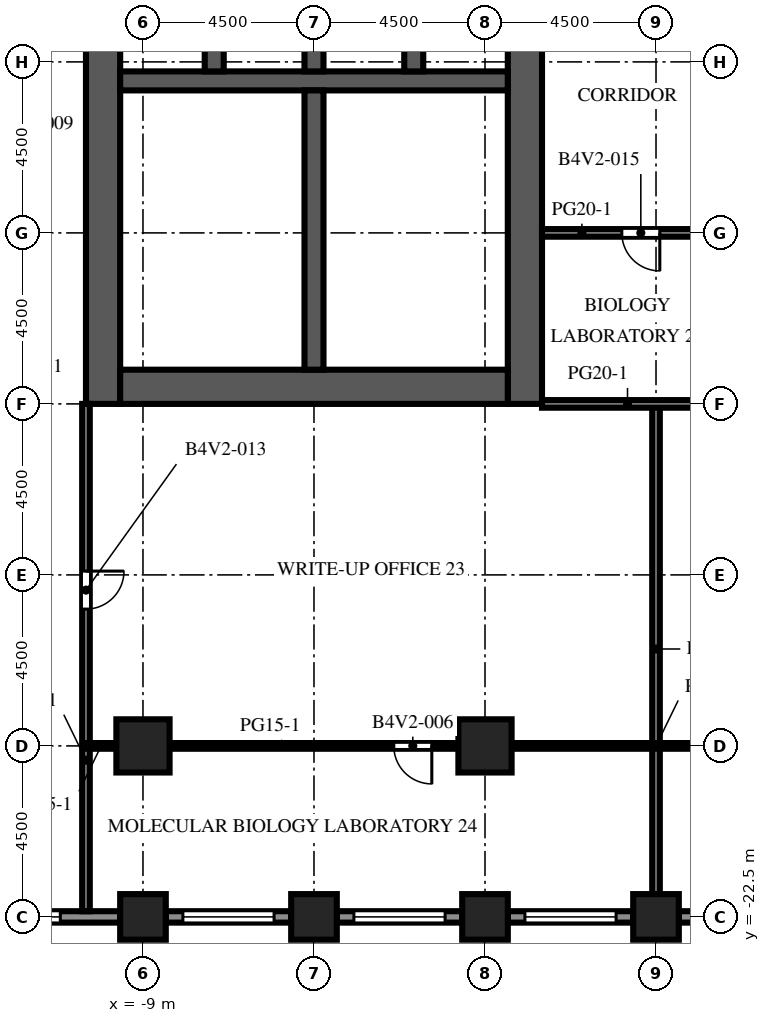
"""IFC4 building model, lengths in metres.
Left out: names, types, materials, properties, quantities, classifications, styles, units other than length and angle.
Written with IfcOpenShell. Run it as: python <this file> out.ifc"""

import sys

from ifc_helpers import new_model, si_unit, direction, frame, frame_2d, origin, origin_2d, place, context, subcontext, project, spatial, rectangle, extrude, element, fill, save


model = new_model("IFC4")
c1 = context("Model", 3, precision=1e-05, world=origin(), true_north=direction((0.0, 1.0)))
c2 = subcontext(c1, "Body", "Model", "MODEL_VIEW")
j1 = project(units=[si_unit("LENGTHUNIT", "METRE"), si_unit("PLANEANGLEUNIT", "RADIAN")], contexts=[c1])
p1 = place(None, origin())
s1 = spatial("IfcSite", under=j1, at=p1, CompositionType="ELEMENT")
p2 = place(p1, origin())
s2 = spatial("IfcBuilding", under=s1, at=p2, CompositionType="ELEMENT")
p3 = place(p2, frame((0.0, 0.0, 137.2)))
s3 = spatial("IfcBuildingStorey", under=s2, at=p3, CompositionType="ELEMENT", Elevation=137.2)
for number, where, z_axis, x_axis in (
    (1, (-9.0, -22.5, 0.0), (0.0, 0.0, 1.0), (1.0, 0.0, 0.0)),
    (2, (-4.5, -22.5, 0.0), (0.0, 0.0, 1.0), (1.0, 0.0, 0.0)),
    (3, (0.0, -22.5, 0.0), (0.0, 0.0, 1.0), (1.0, 0.0, 0.0)),
    (4, (4.5, -22.5, 0.0), (0.0, 0.0, 1.0), (1.0, 0.0, 0.0)),
):
    element("IfcColumn", number, at=place(p3, frame(where, z_axis=z_axis, x_axis=x_axis)), inside=s3, PredefinedType="COLUMN", context=c2, shape_type="SweptSolid", body=[
        extrude(rectangle(XDim=1.2, YDim=1.2, at=origin_2d()), origin(), (0.0, 0.0, 1.0), 4.1),
    ])
for number, where, z_axis, x_axis in (
    (5, (-9.0, -18.0, 0.0), (0.0, 0.0, 1.0), (1.0, 0.0, 0.0)),
    (6, (0.0, -18.0, 0.0), (0.0, 0.0, 1.0), (1.0, 0.0, 0.0)),
):
    element("IfcColumn", number, at=place(p3, frame(where, z_axis=z_axis, x_axis=x_axis)), inside=s3, PredefinedType="COLUMN", context=c2, shape_type="SweptSolid", body=[
        extrude(rectangle(XDim=1.4, YDim=1.4, at=origin_2d()), origin(), (0.0, 0.0, 1.0), 4.1),
    ])
p4 = place(p3, frame((-10.05, -9.0, 0.0), z_axis=(0.0, 0.0, 1.0), x_axis=(0.0, 1.0, 0.0)))
e7 = element("IfcWall", 7, at=p4, inside=s3, PredefinedType="SHEAR", context=c2, shape_type="SweptSolid", body=[
    extrude(rectangle(XDim=27.5, YDim=0.9, at=frame_2d((13.75, 0.0))), origin(), (0.0, 0.0, 1.0), 4.1),
])
p5 = place(p4, frame((12.55, 0.0, 0.0)))
e8 = element("IfcOpeningElement", 8, at=p5, cuts=e7, PredefinedType="OPENING", context=c2, shape_type="SweptSolid", body=[
    extrude(rectangle(XDim=2.4, YDim=2.4, at=frame_2d((1.2, 1.2))), frame((0.0, 0.46, 0.0), z_axis=(0.0, -1.0, 0.0), x_axis=(1.0, 0.0, 0.0)), (0.0, 0.0, 1.0), 0.92),
])
p6 = place(p4, frame((6.825, 0.0, 0.0)))
e9 = element("IfcOpeningElement", 9, at=p6, cuts=e7, PredefinedType="OPENING", context=c2, shape_type="SweptSolid", body=[
    extrude(rectangle(XDim=1.2, YDim=2.1, at=frame_2d((0.6, 1.05))), frame((0.0, 0.46, 0.0), z_axis=(0.0, -1.0, 0.0), x_axis=(1.0, 0.0, 0.0)), (0.0, 0.0, 1.0), 0.92),
])
p7 = place(p4, frame((19.475, 0.0, 0.0)))
e10 = element("IfcOpeningElement", 10, at=p7, cuts=e7, PredefinedType="OPENING", context=c2, shape_type="SweptSolid", body=[
    extrude(rectangle(XDim=1.2, YDim=2.1, at=frame_2d((0.6, 1.05))), frame((0.0, 0.46, 0.0), z_axis=(0.0, -1.0, 0.0), x_axis=(1.0, 0.0, 0.0)), (0.0, 0.0, 1.0), 0.92),
])
p8 = place(p3, frame((1.05, -9.0, 0.0), z_axis=(0.0, 0.0, 1.0), x_axis=(0.0, 1.0, 0.0)))
e11 = element("IfcWall", 11, at=p8, inside=s3, PredefinedType="SHEAR", context=c2, shape_type="SweptSolid", body=[
    extrude(rectangle(XDim=27.5, YDim=0.9, at=frame_2d((13.75, 0.0))), origin(), (0.0, 0.0, 1.0), 4.1),
])
p9 = place(p8, frame((12.55, 0.0, 0.0)))
e12 = element("IfcOpeningElement", 12, at=p9, cuts=e11, PredefinedType="OPENING", context=c2, shape_type="SweptSolid", body=[
    extrude(rectangle(XDim=2.4, YDim=2.4, at=frame_2d((1.2, 1.2))), frame((0.0, 0.46, 0.0), z_axis=(0.0, -1.0, 0.0), x_axis=(1.0, 0.0, 0.0)), (0.0, 0.0, 1.0), 0.92),
])
p10 = place(p8, frame((5.51, 0.0, 0.0)))
e13 = element("IfcOpeningElement", 13, at=p10, cuts=e11, PredefinedType="OPENING", context=c2, shape_type="SweptSolid", body=[
    extrude(rectangle(XDim=0.923, YDim=2.1, at=frame_2d((0.461, 1.05))), frame((0.0, 0.46, 0.0), z_axis=(0.0, -1.0, 0.0), x_axis=(1.0, 0.0, 0.0)), (0.0, 0.0, 1.0), 0.92),
])
p11 = place(p8, frame((23.427, 0.0, 0.0)))
e14 = element("IfcOpeningElement", 14, at=p11, cuts=e11, PredefinedType="OPENING", context=c2, shape_type="SweptSolid", body=[
    extrude(rectangle(XDim=1.2, YDim=2.1, at=frame_2d((0.6, 1.05))), frame((0.0, 0.46, 0.0), z_axis=(0.0, -1.0, 0.0), x_axis=(1.0, 0.0, 0.0)), (0.0, 0.0, 1.0), 0.92),
])
p12 = place(p3, frame((-9.6, -8.55, 0.0), z_axis=(0.0, 0.0, 1.0), x_axis=(1.0, 0.0, 0.0)))
e15 = element("IfcWall", 15, at=p12, inside=s3, PredefinedType="SHEAR", context=c2, shape_type="SweptSolid", body=[
    extrude(rectangle(XDim=10.2, YDim=0.9, at=frame_2d((5.1, 0.0))), origin(), (0.0, 0.0, 1.0), 4.1),
])
p13 = place(p3, frame((-9.6, -0.5, 0.0), z_axis=(0.0, 0.0, 1.0), x_axis=(1.0, 0.0, 0.0)))
e16 = element("IfcWall", 16, at=p13, inside=s3, PredefinedType="SHEAR", context=c2, shape_type="SweptSolid", body=[
    extrude(rectangle(XDim=10.2, YDim=0.5, at=frame_2d((5.1, 0.0))), origin(), (0.0, 0.0, 1.0), 4.1),
])
for number, where, z_axis, x_axis in (
    (17, (-7.125, -0.25, 0.0), (0.0, 0.0, 1.0), (0.0, 1.0, 0.0)),
    (18, (-4.5, -0.25, 0.0), (0.0, 0.0, 1.0), (0.0, 1.0, 0.0)),
    (19, (-1.875, -0.25, 0.0), (0.0, 0.0, 1.0), (0.0, 1.0, 0.0)),
):
    element("IfcWall", number, at=place(p3, frame(where, z_axis=z_axis, x_axis=x_axis)), inside=s3, PredefinedType="SHEAR", context=c2, shape_type="SweptSolid", body=[
        extrude(rectangle(XDim=2.8, YDim=0.5, at=frame_2d((1.4, 0.0))), origin(), (0.0, 0.0, 1.0), 4.1),
    ])
p14 = place(p3, frame((-4.5, -8.1, 0.0), z_axis=(0.0, 0.0, 1.0), x_axis=(0.0, 1.0, 0.0)))
e20 = element("IfcWall", 20, at=p14, inside=s3, PredefinedType="SHEAR", context=c2, shape_type="SweptSolid", body=[
    extrude(rectangle(XDim=7.35, YDim=0.5, at=frame_2d((3.675, 0.0))), origin(), (0.0, 0.0, 1.0), 4.1),
])
p15 = place(p3, frame((-9.6, -22.5, 0.0), z_axis=(0.0, 0.0, 1.0), x_axis=(-1.0, 0.0, 0.0)))
e21 = element("IfcWall", 21, at=p15, inside=s3, PredefinedType="SOLIDWALL", context=c2, shape_type="SweptSolid", body=[
    extrude(rectangle(XDim=3.3, YDim=0.3, at=frame_2d((1.65, 0.0))), origin(), (0.0, 0.0, 1.0), 2.75),
])
p16 = place(p15, frame((1.575, 0.0, 0.8)))
e22 = element("IfcOpeningElement", 22, at=p16, cuts=e21, PredefinedType="OPENING", context=c2, shape_type="SweptSolid", body=[
    extrude(rectangle(XDim=1.2, YDim=1.7, at=frame_2d((0.6, 0.85))), frame((0.0, 0.16, 0.0), z_axis=(0.0, -1.0, 0.0), x_axis=(1.0, 0.0, 0.0)), (0.0, 0.0, 1.0), 0.32),
])
p17 = place(p3, frame((-5.1, -22.5, 0.0), z_axis=(0.0, 0.0, 1.0), x_axis=(-1.0, 0.0, 0.0)))
e23 = element("IfcWall", 23, at=p17, inside=s3, PredefinedType="SOLIDWALL", context=c2, shape_type="SweptSolid", body=[
    extrude(rectangle(XDim=3.3, YDim=0.3, at=frame_2d((1.65, 0.0))), origin(), (0.0, 0.0, 1.0), 2.75),
])
p18 = place(p17, frame((0.45, 0.0, 0.8)))
e24 = element("IfcOpeningElement", 24, at=p18, cuts=e23, PredefinedType="OPENING", context=c2, shape_type="SweptSolid", body=[
    extrude(rectangle(XDim=2.4, YDim=1.7, at=frame_2d((1.2, 0.85))), frame((0.0, 0.16, 0.0), z_axis=(0.0, -1.0, 0.0), x_axis=(1.0, 0.0, 0.0)), (0.0, 0.0, 1.0), 0.32),
])
p19 = place(p3, frame((-0.6, -22.5, 0.0), z_axis=(0.0, 0.0, 1.0), x_axis=(-1.0, 0.0, 0.0)))
e25 = element("IfcWall", 25, at=p19, inside=s3, PredefinedType="SOLIDWALL", context=c2, shape_type="SweptSolid", body=[
    extrude(rectangle(XDim=3.3, YDim=0.3, at=frame_2d((1.65, 0.0))), origin(), (0.0, 0.0, 1.0), 2.75),
])
p20 = place(p19, frame((0.45, 0.0, 0.8)))
e26 = element("IfcOpeningElement", 26, at=p20, cuts=e25, PredefinedType="OPENING", context=c2, shape_type="SweptSolid", body=[
    extrude(rectangle(XDim=2.4, YDim=1.7, at=frame_2d((1.2, 0.85))), frame((0.0, 0.16, 0.0), z_axis=(0.0, -1.0, 0.0), x_axis=(1.0, 0.0, 0.0)), (0.0, 0.0, 1.0), 0.32),
])
p21 = place(p3, frame((3.9, -22.5, 0.0), z_axis=(0.0, 0.0, 1.0), x_axis=(-1.0, 0.0, 0.0)))
e27 = element("IfcWall", 27, at=p21, inside=s3, PredefinedType="SOLIDWALL", context=c2, shape_type="SweptSolid", body=[
    extrude(rectangle(XDim=3.3, YDim=0.3, at=frame_2d((1.65, 0.0))), origin(), (0.0, 0.0, 1.0), 2.75),
])
p22 = place(p21, frame((0.45, 0.0, 0.8)))
e28 = element("IfcOpeningElement", 28, at=p22, cuts=e27, PredefinedType="OPENING", context=c2, shape_type="SweptSolid", body=[
    extrude(rectangle(XDim=2.4, YDim=1.7, at=frame_2d((1.2, 0.85))), frame((0.0, 0.16, 0.0), z_axis=(0.0, -1.0, 0.0), x_axis=(1.0, 0.0, 0.0)), (0.0, 0.0, 1.0), 0.32),
])
p23 = place(p3, frame((8.4, -22.5, 0.0), z_axis=(0.0, 0.0, 1.0), x_axis=(-1.0, 0.0, 0.0)))
e29 = element("IfcWall", 29, at=p23, inside=s3, PredefinedType="SOLIDWALL", context=c2, shape_type="SweptSolid", body=[
    extrude(rectangle(XDim=3.3, YDim=0.3, at=frame_2d((1.65, 0.0))), origin(), (0.0, 0.0, 1.0), 2.75),
])
p24 = place(p23, frame((0.45, 0.0, 0.8)))
e30 = element("IfcOpeningElement", 30, at=p24, cuts=e29, PredefinedType="OPENING", context=c2, shape_type="SweptSolid", body=[
    extrude(rectangle(XDim=2.4, YDim=1.7, at=frame_2d((1.2, 0.85))), frame((0.0, 0.16, 0.0), z_axis=(0.0, -1.0, 0.0), x_axis=(1.0, 0.0, 0.0)), (0.0, 0.0, 1.0), 0.32),
])
p25 = place(p3, frame((-1.825, -3.69, 0.0), z_axis=(0.0, 0.0, 1.0), x_axis=(1.0, 0.0, 0.0)))
e31 = element("IfcWall", 31, at=p25, inside=s3, PredefinedType="PARTITIONING", context=c2, shape_type="SweptSolid", body=[
    extrude(rectangle(XDim=2.425, YDim=0.1, at=frame_2d((1.212, 0.0))), origin(), (0.0, 0.0, 1.0), 3.65),
])
p26 = place(p25, frame((0.712, 0.0, 0.0)))
e32 = element("IfcOpeningElement", 32, at=p26, cuts=e31, PredefinedType="OPENING", context=c2, shape_type="SweptSolid", body=[
    extrude(rectangle(XDim=1.0, YDim=2.1, at=frame_2d((0.5, 1.05))), frame((0.0, 0.06, 0.0), z_axis=(0.0, -1.0, 0.0), x_axis=(1.0, 0.0, 0.0)), (0.0, 0.0, 1.0), 0.12),
])
p27 = place(p3, frame((-4.25, -3.69, 0.0), z_axis=(0.0, 0.0, 1.0), x_axis=(1.0, 0.0, 0.0)))
e33 = element("IfcWall", 33, at=p27, inside=s3, PredefinedType="PARTITIONING", context=c2, shape_type="SweptSolid", body=[
    extrude(rectangle(XDim=2.425, YDim=0.1, at=frame_2d((1.212, 0.0))), origin(), (0.0, 0.0, 1.0), 3.65),
])
p28 = place(p27, frame((0.712, 0.0, 0.0)))
e34 = element("IfcOpeningElement", 34, at=p28, cuts=e33, PredefinedType="OPENING", context=c2, shape_type="SweptSolid", body=[
    extrude(rectangle(XDim=1.0, YDim=2.1, at=frame_2d((0.5, 1.05))), frame((0.0, 0.06, 0.0), z_axis=(0.0, -1.0, 0.0), x_axis=(1.0, 0.0, 0.0)), (0.0, 0.0, 1.0), 0.12),
])
p29 = place(p3, frame((-1.825, -2.367, 0.0), z_axis=(0.0, 0.0, 1.0), x_axis=(1.0, 0.0, 0.0)))
e35 = element("IfcWall", 35, at=p29, inside=s3, PredefinedType="PARTITIONING", context=c2, shape_type="SweptSolid", body=[
    extrude(rectangle(XDim=2.425, YDim=0.1, at=frame_2d((1.212, 0.0))), origin(), (0.0, 0.0, 1.0), 3.65),
])
p30 = place(p29, frame((0.712, 0.0, 0.0)))
e36 = element("IfcOpeningElement", 36, at=p30, cuts=e35, PredefinedType="OPENING", context=c2, shape_type="SweptSolid", body=[
    extrude(rectangle(XDim=1.0, YDim=2.1, at=frame_2d((0.5, 1.05))), frame((0.0, 0.06, 0.0), z_axis=(0.0, -1.0, 0.0), x_axis=(1.0, 0.0, 0.0)), (0.0, 0.0, 1.0), 0.12),
])
p31 = place(p3, frame((-4.25, -2.367, 0.0), z_axis=(0.0, 0.0, 1.0), x_axis=(1.0, 0.0, 0.0)))
e37 = element("IfcWall", 37, at=p31, inside=s3, PredefinedType="PARTITIONING", context=c2, shape_type="SweptSolid", body=[
    extrude(rectangle(XDim=2.425, YDim=0.1, at=frame_2d((1.212, 0.0))), origin(), (0.0, 0.0, 1.0), 3.65),
])
p32 = place(p31, frame((0.712, 0.0, 0.0)))
e38 = element("IfcOpeningElement", 38, at=p32, cuts=e37, PredefinedType="OPENING", context=c2, shape_type="SweptSolid", body=[
    extrude(rectangle(XDim=1.0, YDim=2.1, at=frame_2d((0.5, 1.05))), frame((0.0, 0.06, 0.0), z_axis=(0.0, -1.0, 0.0), x_axis=(1.0, 0.0, 0.0)), (0.0, 0.0, 1.0), 0.12),
])
p33 = place(p3, frame((-1.825, -8.1, 0.0), z_axis=(0.0, 0.0, 1.0), x_axis=(0.0, 1.0, 0.0)))
e39 = element("IfcWall", 39, at=p33, inside=s3, PredefinedType="PARTITIONING", context=c2, shape_type="SweptSolid", body=[
    extrude(rectangle(XDim=4.41, YDim=0.1, at=frame_2d((2.205, 0.0))), origin(), (0.0, 0.0, 1.0), 3.65),
])
p34 = place(p3, frame((-1.825, -2.367, 0.0), z_axis=(0.0, 0.0, 1.0), x_axis=(0.0, 1.0, 0.0)))
e40 = element("IfcWall", 40, at=p34, inside=s3, PredefinedType="PARTITIONING", context=c2, shape_type="SweptSolid", body=[
    extrude(rectangle(XDim=1.617, YDim=0.1, at=frame_2d((0.809, 0.0))), origin(), (0.0, 0.0, 1.0), 3.65),
])
p35 = place(p3, frame((-10.5, -9.0, 0.0), z_axis=(0.0, 0.0, 1.0), x_axis=(0.0, -1.0, 0.0)))
e41 = element("IfcWall", 41, at=p35, inside=s3, PredefinedType="PARTITIONING", context=c2, shape_type="SweptSolid", body=[
    extrude(rectangle(XDim=13.35, YDim=0.2, at=frame_2d((6.675, 0.0))), origin(), (0.0, 0.0, 1.0), 3.65),
])
p36 = place(p35, frame((4.4, 0.0, 0.0)))
e42 = element("IfcOpeningElement", 42, at=p36, cuts=e41, PredefinedType="OPENING", context=c2, shape_type="SweptSolid", body=[
    extrude(rectangle(XDim=1.0, YDim=2.1, at=frame_2d((0.5, 1.05))), frame((0.0, 0.11, 0.0), z_axis=(0.0, -1.0, 0.0), x_axis=(1.0, 0.0, 0.0)), (0.0, 0.0, 1.0), 0.22),
])
p37 = place(p3, frame((4.5, -21.9, 0.0), z_axis=(0.0, 0.0, 1.0), x_axis=(0.0, 1.0, 0.0)))
e43 = element("IfcWall", 43, at=p37, inside=s3, PredefinedType="PARTITIONING", context=c2, shape_type="SweptSolid", body=[
    extrude(rectangle(XDim=12.9, YDim=0.2, at=frame_2d((6.45, 0.0))), origin(), (0.0, 0.0, 1.0), 3.65),
])
p38 = place(p3, frame((-10.5, -18.0, 0.0), z_axis=(0.0, 0.0, 1.0), x_axis=(1.0, 0.0, 0.0)))
e44 = element("IfcWall", 44, at=p38, inside=s3, PredefinedType="PARTITIONING", context=c2, shape_type="SweptSolid", body=[
    extrude(rectangle(XDim=0.8, YDim=0.15, at=frame_2d((0.4, 0.0))), origin(), (0.0, 0.0, 1.0), 3.65),
])
p39 = place(p3, frame((-0.7, -18.0, 0.0), z_axis=(0.0, 0.0, 1.0), x_axis=(-1.0, 0.0, 0.0)))
e45 = element("IfcWall", 45, at=p39, inside=s3, PredefinedType="PARTITIONING", context=c2, shape_type="SweptSolid", body=[
    extrude(rectangle(XDim=7.6, YDim=0.15, at=frame_2d((3.8, 0.0))), origin(), (0.0, 0.0, 1.0), 3.65),
])
p40 = place(p39, frame((0.7, 0.0, 0.0)))
e46 = element("IfcOpeningElement", 46, at=p40, cuts=e45, PredefinedType="OPENING", context=c2, shape_type="SweptSolid", body=[
    extrude(rectangle(XDim=1.0, YDim=2.1, at=frame_2d((0.5, 1.05))), frame((0.0, 0.085, 0.0), z_axis=(0.0, -1.0, 0.0), x_axis=(1.0, 0.0, 0.0)), (0.0, 0.0, 1.0), 0.17),
])
p41 = place(p3, frame((0.7, -18.0, 0.0), z_axis=(0.0, 0.0, 1.0), x_axis=(1.0, 0.0, 0.0)))
e47 = element("IfcWall", 47, at=p41, inside=s3, PredefinedType="PARTITIONING", context=c2, shape_type="SweptSolid", body=[
    extrude(rectangle(XDim=7.6, YDim=0.15, at=frame_2d((3.8, 0.0))), origin(), (0.0, 0.0, 1.0), 3.65),
])
p42 = place(p3, frame((1.5, -9.0, 0.0), z_axis=(0.0, 0.0, 1.0), x_axis=(1.0, 0.0, 0.0)))
e48 = element("IfcWall", 48, at=p42, inside=s3, PredefinedType="PARTITIONING", context=c2, shape_type="SweptSolid", body=[
    extrude(rectangle(XDim=4.5, YDim=0.2, at=frame_2d((2.25, 0.0))), origin(), (0.0, 0.0, 1.0), 3.65),
])
p43 = place(p3, frame((6.0, -4.5, 0.0), z_axis=(0.0, 0.0, 1.0), x_axis=(-1.0, 0.0, 0.0)))
e49 = element("IfcWall", 49, at=p43, inside=s3, PredefinedType="PARTITIONING", context=c2, shape_type="SweptSolid", body=[
    extrude(rectangle(XDim=4.5, YDim=0.2, at=frame_2d((2.25, 0.0))), origin(), (0.0, 0.0, 1.0), 3.65),
])
p44 = place(p43, frame((1.4, 0.0, 0.0)))
e50 = element("IfcOpeningElement", 50, at=p44, cuts=e49, PredefinedType="OPENING", context=c2, shape_type="SweptSolid", body=[
    extrude(rectangle(XDim=1.0, YDim=2.1, at=frame_2d((0.5, 1.05))), frame((0.0, 0.11, 0.0), z_axis=(0.0, -1.0, 0.0), x_axis=(1.0, 0.0, 0.0)), (0.0, 0.0, 1.0), 0.22),
])
p45 = place(p16, origin())
e51 = element("IfcWindow", 51, at=p45, inside=s3, PartitioningType="SINGLE_PANEL", PredefinedType="WINDOW", context=c2, shape_type="SweptSolid", body=[
    extrude(rectangle(XDim=1.2, YDim=1.7, at=frame_2d((0.6, 0.85))), frame((0.0, 0.03, 0.0), z_axis=(0.0, -1.0, 0.0), x_axis=(1.0, 0.0, 0.0)), (0.0, 0.0, 1.0), 0.06),
])
fill(e22, e51)
p46 = place(p18, origin())
e52 = element("IfcWindow", 52, at=p46, inside=s3, PartitioningType="SINGLE_PANEL", PredefinedType="WINDOW", context=c2, shape_type="SweptSolid", body=[
    extrude(rectangle(XDim=2.4, YDim=1.7, at=frame_2d((1.2, 0.85))), frame((0.0, 0.03, 0.0), z_axis=(0.0, -1.0, 0.0), x_axis=(1.0, 0.0, 0.0)), (0.0, 0.0, 1.0), 0.06),
])
fill(e24, e52)
p47 = place(p20, origin())
e53 = element("IfcWindow", 53, at=p47, inside=s3, PartitioningType="SINGLE_PANEL", PredefinedType="WINDOW", context=c2, shape_type="SweptSolid", body=[
    extrude(rectangle(XDim=2.4, YDim=1.7, at=frame_2d((1.2, 0.85))), frame((0.0, 0.03, 0.0), z_axis=(0.0, -1.0, 0.0), x_axis=(1.0, 0.0, 0.0)), (0.0, 0.0, 1.0), 0.06),
])
fill(e26, e53)
p48 = place(p22, origin())
e54 = element("IfcWindow", 54, at=p48, inside=s3, PartitioningType="SINGLE_PANEL", PredefinedType="WINDOW", context=c2, shape_type="SweptSolid", body=[
    extrude(rectangle(XDim=2.4, YDim=1.7, at=frame_2d((1.2, 0.85))), frame((0.0, 0.03, 0.0), z_axis=(0.0, -1.0, 0.0), x_axis=(1.0, 0.0, 0.0)), (0.0, 0.0, 1.0), 0.06),
])
fill(e28, e54)
p49 = place(p6, origin())
e55 = element("IfcDoor", 55, at=p49, inside=s3, OperationType="SINGLE_SWING_LEFT", PredefinedType="DOOR", context=c2, shape_type="SweptSolid", body=[
    extrude(rectangle(XDim=1.2, YDim=2.1, at=frame_2d((0.6, 1.05))), frame((0.0, 0.025, 0.0), z_axis=(0.0, -1.0, 0.0), x_axis=(1.0, 0.0, 0.0)), (0.0, 0.0, 1.0), 0.05),
])
fill(e9, e55)
p50 = place(p10, origin())
e56 = element("IfcDoor", 56, at=p50, inside=s3, OperationType="SINGLE_SWING_LEFT", PredefinedType="DOOR", context=c2, shape_type="SweptSolid", body=[
    extrude(rectangle(XDim=0.923, YDim=2.1, at=frame_2d((0.461, 1.05))), frame((0.0, 0.425, 0.0), z_axis=(0.0, -1.0, 0.0), x_axis=(1.0, 0.0, 0.0)), (0.0, 0.0, 1.0), 0.05),
])
fill(e13, e56)
p51 = place(p26, origin())
e57 = element("IfcDoor", 57, at=p51, inside=s3, OperationType="SINGLE_SWING_RIGHT", PredefinedType="DOOR", context=c2, shape_type="SweptSolid", body=[
    extrude(rectangle(XDim=1.0, YDim=2.1, at=frame_2d((0.5, 1.05))), frame((0.0, 0.025, 0.0), z_axis=(0.0, -1.0, 0.0), x_axis=(1.0, 0.0, 0.0)), (0.0, 0.0, 1.0), 0.05),
])
fill(e32, e57)
p52 = place(p28, origin())
e58 = element("IfcDoor", 58, at=p52, inside=s3, OperationType="SINGLE_SWING_LEFT", PredefinedType="DOOR", context=c2, shape_type="SweptSolid", body=[
    extrude(rectangle(XDim=1.0, YDim=2.1, at=frame_2d((0.5, 1.05))), frame((0.0, 0.025, 0.0), z_axis=(0.0, -1.0, 0.0), x_axis=(1.0, 0.0, 0.0)), (0.0, 0.0, 1.0), 0.05),
])
fill(e34, e58)
p53 = place(p30, origin())
e59 = element("IfcDoor", 59, at=p53, inside=s3, OperationType="SINGLE_SWING_RIGHT", PredefinedType="DOOR", context=c2, shape_type="SweptSolid", body=[
    extrude(rectangle(XDim=1.0, YDim=2.1, at=frame_2d((0.5, 1.05))), frame((0.0, 0.025, 0.0), z_axis=(0.0, -1.0, 0.0), x_axis=(1.0, 0.0, 0.0)), (0.0, 0.0, 1.0), 0.05),
])
fill(e36, e59)
p54 = place(p32, origin())
e60 = element("IfcDoor", 60, at=p54, inside=s3, OperationType="SINGLE_SWING_LEFT", PredefinedType="DOOR", context=c2, shape_type="SweptSolid", body=[
    extrude(rectangle(XDim=1.0, YDim=2.1, at=frame_2d((0.5, 1.05))), frame((0.0, 0.025, 0.0), z_axis=(0.0, -1.0, 0.0), x_axis=(1.0, 0.0, 0.0)), (0.0, 0.0, 1.0), 0.05),
])
fill(e38, e60)
p55 = place(p40, origin())
e61 = element("IfcDoor", 61, at=p55, inside=s3, OperationType="SINGLE_SWING_LEFT", PredefinedType="DOOR", context=c2, shape_type="SweptSolid", body=[
    extrude(rectangle(XDim=1.0, YDim=2.1, at=frame_2d((0.5, 1.05))), frame((0.0, 0.025, 0.0), z_axis=(0.0, -1.0, 0.0), x_axis=(1.0, 0.0, 0.0)), (0.0, 0.0, 1.0), 0.05),
])
fill(e46, e61)
p56 = place(p36, origin())
e62 = element("IfcDoor", 62, at=p56, inside=s3, OperationType="SINGLE_SWING_LEFT", PredefinedType="DOOR", context=c2, shape_type="SweptSolid", body=[
    extrude(rectangle(XDim=1.0, YDim=2.1, at=frame_2d((0.5, 1.05))), frame((0.0, 0.025, 0.0), z_axis=(0.0, -1.0, 0.0), x_axis=(1.0, 0.0, 0.0)), (0.0, 0.0, 1.0), 0.05),
])
fill(e42, e62)
p57 = place(p44, origin())
e63 = element("IfcDoor", 63, at=p57, inside=s3, OperationType="SINGLE_SWING_LEFT", PredefinedType="DOOR", context=c2, shape_type="SweptSolid", body=[
    extrude(rectangle(XDim=1.0, YDim=2.1, at=frame_2d((0.5, 1.05))), frame((0.0, 0.025, 0.0), z_axis=(0.0, -1.0, 0.0), x_axis=(1.0, 0.0, 0.0)), (0.0, 0.0, 1.0), 0.05),
])
fill(e50, e63)
save(model, sys.argv[1])
